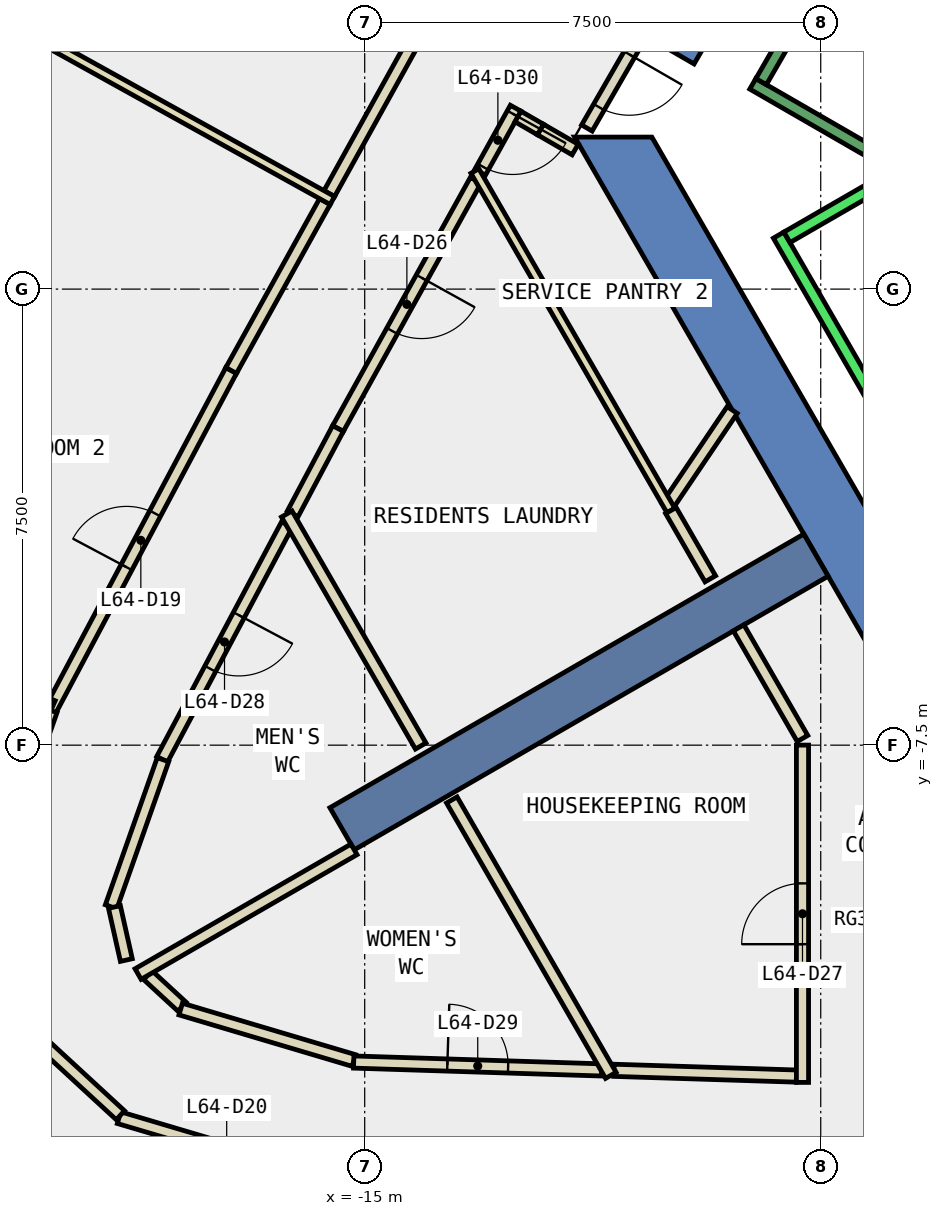
"""IFC4 building model, lengths in metres.
Left out: names, types, materials, properties, quantities, classifications, styles, units other than length and angle.
Written with IfcOpenShell. Run it as: python <this file> out.ifc"""

import sys

from ifc_helpers import new_model, si_unit, direction, frame, frame_2d, origin, place, context, subcontext, project, spatial, polyline, rectangle, outline, extrude, element, fill, save


model = new_model("IFC4")
c1 = context("Model", 3, precision=1e-05, world=origin(), true_north=direction((0.0, 1.0)))
c2 = subcontext(c1, "Body", "Model", "MODEL_VIEW")
j1 = project(units=[si_unit("LENGTHUNIT", "METRE"), si_unit("PLANEANGLEUNIT", "RADIAN")], contexts=[c1])
p1 = place(None, origin())
s1 = spatial("IfcSite", under=j1, at=p1, CompositionType="ELEMENT")
p2 = place(p1, origin())
s2 = spatial("IfcBuilding", under=s1, at=p2, CompositionType="ELEMENT")
p3 = place(p2, frame((0.0, 0.0, 277.4)))
s3 = spatial("IfcBuildingStorey", under=s2, at=p3, CompositionType="ELEMENT", Elevation=277.4)
p4 = place(p3, frame((0.0, 0.0, -0.34)))
e1 = element("IfcWall", 1, at=p4, inside=s3, PredefinedType="SHEAR", context=c2, shape_type="SweptSolid", body=[
    extrude(outline(polyline([(-10.535, 4.253), (-9.583, 3.703), (-5.138, 11.4), (-5.774, 12.5), (-10.535, 4.253)])), origin(), (0.0, 0.0, 1.0), 3.34),
])
p5 = place(p3, frame((0.0, 0.0, -0.34)))
e2 = element("IfcWall", 2, at=p5, inside=s3, PredefinedType="SHEAR", context=c2, shape_type="SweptSolid", body=[
    extrude(outline(polyline([(-11.547, 2.5), (-5.774, -7.5), (-5.138, -6.4), (-10.277, 2.5), (-11.547, 2.5)])), origin(), (0.0, 0.0, 1.0), 3.34),
])
p6 = place(p3, frame((-7.578, -4.375, -0.34), z_axis=(0.0, 0.0, 1.0), x_axis=(-0.866024315419, -0.5000018851, 0.0)))
e3 = element("IfcWall", 3, at=p6, inside=s3, PredefinedType="SHEAR", context=c2, shape_type="SweptSolid", body=[
    extrude(rectangle(XDim=9.0, YDim=0.8, at=frame_2d((4.5, 0.0))), origin(), (0.0, 0.0, 1.0), 3.34),
])
p7 = place(p3, frame((-19.984, 7.14, 0.0), z_axis=(0.0, 0.0, 1.0), x_axis=(-0.485049005017, -0.874486971162, 0.0)))
e4 = element("IfcWall", 4, at=p7, inside=s3, PredefinedType="STANDARD", context=c2, shape_type="SweptSolid", body=[
    extrude(rectangle(XDim=5.62, YDim=0.3, at=frame_2d((2.81, 0.0))), origin(), (0.0, 0.0, 1.0), 3.0),
])
p8 = place(p7, frame((0.455, 0.0, 0.9)))
e5 = element("IfcOpeningElement", 5, at=p8, cuts=e4, PredefinedType="OPENING", context=c2, shape_type="SweptSolid", body=[
    extrude(rectangle(XDim=1.9, YDim=2.0, at=frame_2d((0.95, 1.0))), frame((0.0, 0.16, 0.0), z_axis=(0.0, -1.0, 0.0), x_axis=(1.0, 0.0, 0.0)), (0.0, 0.0, 1.0), 0.32),
])
p9 = place(p7, frame((3.265, 0.0, 0.9)))
e6 = element("IfcOpeningElement", 6, at=p9, cuts=e4, PredefinedType="OPENING", context=c2, shape_type="SweptSolid", body=[
    extrude(rectangle(XDim=1.9, YDim=2.0, at=frame_2d((0.95, 1.0))), frame((0.0, 0.16, 0.0), z_axis=(0.0, -1.0, 0.0), x_axis=(1.0, 0.0, 0.0)), (0.0, 0.0, 1.0), 0.32),
])
p10 = place(p3, frame((-11.539, 2.295, 0.0), z_axis=(0.0, 0.0, 1.0), x_axis=(-0.86577241902, 0.500437926684, 0.0)))
e7 = element("IfcWall", 7, at=p10, inside=s3, PredefinedType="PARTITIONING", context=c2, shape_type="SweptSolid", body=[
    extrude(rectangle(XDim=0.66, YDim=0.2, at=frame_2d((0.33, 0.0))), origin(), (0.0, 0.0, 1.0), 2.4),
])
p11 = place(p3, frame((-12.517, 2.975, 0.0), z_axis=(0.0, 0.0, 1.0), x_axis=(-0.485195833999, -0.87440551386, 0.0)))
e8 = element("IfcWall", 8, at=p11, inside=s3, PredefinedType="PARTITIONING", context=c2, shape_type="SweptSolid", body=[
    extrude(rectangle(XDim=1.206, YDim=0.2, at=frame_2d((0.603, 0.0))), origin(), (0.0, 0.0, 1.0), 3.0),
])
p12 = place(p11, frame((0.103, 0.0, 0.0)))
e9 = element("IfcOpeningElement", 9, at=p12, cuts=e8, PredefinedType="OPENING", context=c2, shape_type="SweptSolid", body=[
    extrude(rectangle(XDim=1.0, YDim=2.1, at=frame_2d((0.5, 1.05))), frame((0.0, 0.11, 0.0), z_axis=(0.0, -1.0, 0.0), x_axis=(1.0, 0.0, 0.0)), (0.0, 0.0, 1.0), 0.22),
])
p13 = place(p3, frame((-13.174, 1.79, 0.0), z_axis=(0.0, 0.0, 1.0), x_axis=(-0.485079003918, -0.874470331091, 0.0)))
e10 = element("IfcWall", 10, at=p13, inside=s3, PredefinedType="PARTITIONING", context=c2, shape_type="SweptSolid", body=[
    extrude(rectangle(XDim=4.669, YDim=0.2, at=frame_2d((2.334, 0.0))), origin(), (0.0, 0.0, 1.0), 3.0),
])
p14 = place(p13, frame((1.834, 0.0, 0.0)))
e11 = element("IfcOpeningElement", 11, at=p14, cuts=e10, PredefinedType="OPENING", context=c2, shape_type="SweptSolid", body=[
    extrude(rectangle(XDim=1.0, YDim=2.1, at=frame_2d((0.5, 1.05))), frame((0.0, 0.11, 0.0), z_axis=(0.0, -1.0, 0.0), x_axis=(1.0, 0.0, 0.0)), (0.0, 0.0, 1.0), 0.22),
])
p15 = place(p3, frame((-15.439, -2.293, 0.0), z_axis=(0.0, 0.0, 1.0), x_axis=(-0.469248780065, -0.883066012486, 0.0)))
e12 = element("IfcWall", 12, at=p15, inside=s3, PredefinedType="PARTITIONING", context=c2, shape_type="SweptSolid", body=[
    extrude(rectangle(XDim=1.59, YDim=0.2, at=frame_2d((0.795, 0.0))), origin(), (0.0, 0.0, 1.0), 3.0),
])
p16 = place(p3, frame((-10.902, -12.847, 0.0), z_axis=(0.0, 0.0, 1.0), x_axis=(0.999500028713, -0.031617915847, 0.0)))
e13 = element("IfcWall", 13, at=p16, inside=s3, PredefinedType="PARTITIONING", context=c2, shape_type="SweptSolid", body=[
    extrude(rectangle(XDim=3.004, YDim=0.2, at=frame_2d((1.502, 0.0))), origin(), (0.0, 0.0, 1.0), 3.0),
])
p17 = place(p3, frame((-16.279, -3.873, 0.0), z_axis=(0.0, 0.0, 1.0), x_axis=(-0.469587967357, -0.882885689608, 0.0)))
e14 = element("IfcWall", 14, at=p17, inside=s3, PredefinedType="PARTITIONING", context=c2, shape_type="SweptSolid", body=[
    extrude(rectangle(XDim=4.372, YDim=0.2, at=frame_2d((2.186, 0.0))), origin(), (0.0, 0.0, 1.0), 3.0),
])
p18 = place(p17, frame((1.686, 0.0, 0.0)))
e15 = element("IfcOpeningElement", 15, at=p18, cuts=e14, PredefinedType="OPENING", context=c2, shape_type="SweptSolid", body=[
    extrude(rectangle(XDim=1.0, YDim=2.1, at=frame_2d((0.5, 1.05))), frame((0.0, 0.11, 0.0), z_axis=(0.0, -1.0, 0.0), x_axis=(1.0, 0.0, 0.0)), (0.0, 0.0, 1.0), 0.22),
])
p19 = place(p3, frame((-18.318, -7.739, 0.0), z_axis=(0.0, 0.0, 1.0), x_axis=(-0.332486504777, -0.943108012977, 0.0)))
e16 = element("IfcWall", 16, at=p19, inside=s3, PredefinedType="PARTITIONING", context=c2, shape_type="SweptSolid", body=[
    extrude(rectangle(XDim=2.565, YDim=0.2, at=frame_2d((1.282, 0.0))), origin(), (0.0, 0.0, 1.0), 3.0),
])
p20 = place(p3, frame((-19.116, -10.161, 0.0), z_axis=(0.0, 0.0, 1.0), x_axis=(0.219096654714, -0.975703159723, 0.0)))
e17 = element("IfcWall", 17, at=p20, inside=s3, PredefinedType="PARTITIONING", context=c2, shape_type="SweptSolid", body=[
    extrude(rectangle(XDim=0.895, YDim=0.2, at=frame_2d((0.447, 0.0))), origin(), (0.0, 0.0, 1.0), 3.0),
])
p21 = place(p3, frame((-18.567, -11.282, 0.0), z_axis=(0.0, 0.0, 1.0), x_axis=(0.735218904444, -0.677829744514, 0.0)))
e18 = element("IfcWall", 18, at=p21, inside=s3, PredefinedType="PARTITIONING", context=c2, shape_type="SweptSolid", body=[
    extrude(rectangle(XDim=0.766, YDim=0.2, at=frame_2d((0.383, 0.0))), origin(), (0.0, 0.0, 1.0), 3.0),
])
p22 = place(p3, frame((-18.026, -11.84, 0.0), z_axis=(0.0, 0.0, 1.0), x_axis=(0.958629704259, -0.284656090947, 0.0)))
e19 = element("IfcWall", 19, at=p22, inside=s3, PredefinedType="PARTITIONING", context=c2, shape_type="SweptSolid", body=[
    extrude(rectangle(XDim=2.972, YDim=0.2, at=frame_2d((1.486, 0.0))), origin(), (0.0, 0.0, 1.0), 3.0),
])
p23 = place(p3, frame((-15.181, -12.711, 0.0), z_axis=(0.0, 0.0, 1.0), x_axis=(0.999491493959, -0.031886572471, 0.0)))
e20 = element("IfcWall", 20, at=p23, inside=s3, PredefinedType="PARTITIONING", context=c2, shape_type="SweptSolid", body=[
    extrude(rectangle(XDim=4.081, YDim=0.2, at=frame_2d((2.041, 0.0))), origin(), (0.0, 0.0, 1.0), 3.0),
])
p24 = place(p23, frame((1.541, 0.0, 0.0)))
e21 = element("IfcOpeningElement", 21, at=p24, cuts=e20, PredefinedType="OPENING", context=c2, shape_type="SweptSolid", body=[
    extrude(rectangle(XDim=1.0, YDim=2.1, at=frame_2d((0.5, 1.05))), frame((0.0, 0.11, 0.0), z_axis=(0.0, -1.0, 0.0), x_axis=(1.0, 0.0, 0.0)), (0.0, 0.0, 1.0), 0.22),
])
p25 = place(p3, frame((-15.583, 1.571, 0.0), z_axis=(0.0, 0.0, 1.0), x_axis=(0.484944791944, 0.874544766588, 0.0)))
e22 = element("IfcWall", 22, at=p25, inside=s3, PredefinedType="PARTITIONING", context=c2, shape_type="SweptSolid", body=[
    extrude(rectangle(XDim=3.178, YDim=0.2, at=frame_2d((1.589, 0.0))), origin(), (0.0, 0.0, 1.0), 3.0),
])
p26 = place(p3, frame((-20.168, -6.926, 0.0), z_axis=(0.0, 0.0, 1.0), x_axis=(0.469552838911, 0.882904372778, 0.0)))
e23 = element("IfcWall", 23, at=p26, inside=s3, PredefinedType="PARTITIONING", context=c2, shape_type="SweptSolid", body=[
    extrude(rectangle(XDim=6.329, YDim=0.2, at=frame_2d((3.165, 0.0))), origin(), (0.0, 0.0, 1.0), 3.0),
])
p27 = place(p26, frame((2.665, 0.0, 0.0)))
e24 = element("IfcOpeningElement", 24, at=p27, cuts=e23, PredefinedType="OPENING", context=c2, shape_type="SweptSolid", body=[
    extrude(rectangle(XDim=1.0, YDim=2.1, at=frame_2d((0.5, 1.05))), frame((0.0, 0.11, 0.0), z_axis=(0.0, -1.0, 0.0), x_axis=(1.0, 0.0, 0.0)), (0.0, 0.0, 1.0), 0.22),
])
p28 = place(p3, frame((-17.196, -1.338, 0.0), z_axis=(0.0, 0.0, 1.0), x_axis=(0.485107756493, 0.87445438108, 0.0)))
e25 = element("IfcWall", 25, at=p28, inside=s3, PredefinedType="PARTITIONING", context=c2, shape_type="SweptSolid", body=[
    extrude(rectangle(XDim=3.177, YDim=0.2, at=frame_2d((1.588, 0.0))), origin(), (0.0, 0.0, 1.0), 3.0),
])
p29 = place(p3, frame((-15.499, -14.676, 0.0), z_axis=(0.0, 0.0, 1.0), x_axis=(-0.958734738219, 0.284302131073, 0.0)))
e26 = element("IfcWall", 26, at=p29, inside=s3, PredefinedType="PARTITIONING", context=c2, shape_type="SweptSolid", body=[
    extrude(rectangle(XDim=3.693, YDim=0.2, at=frame_2d((1.847, 0.0))), origin(), (0.0, 0.0, 1.0), 3.0),
])
p30 = place(p29, frame((1.347, 0.0, 0.0)))
e27 = element("IfcOpeningElement", 27, at=p30, cuts=e26, PredefinedType="OPENING", context=c2, shape_type="SweptSolid", body=[
    extrude(rectangle(XDim=1.0, YDim=2.1, at=frame_2d((0.5, 1.05))), frame((0.0, 0.11, 0.0), z_axis=(0.0, -1.0, 0.0), x_axis=(1.0, 0.0, 0.0)), (0.0, 0.0, 1.0), 0.22),
])
p31 = place(p3, frame((-19.018, -13.586, 0.0), z_axis=(0.0, 0.0, 1.0), x_axis=(-0.735547704352, 0.67747293276, 0.0)))
e28 = element("IfcWall", 28, at=p31, inside=s3, PredefinedType="PARTITIONING", context=c2, shape_type="SweptSolid", body=[
    extrude(rectangle(XDim=2.463, YDim=0.2, at=frame_2d((1.232, 0.0))), origin(), (0.0, 0.0, 1.0), 3.0),
])
p32 = place(p3, frame((-21.248, -10.035, 0.0), z_axis=(0.0, 0.0, 1.0), x_axis=(0.332233916116, 0.943197023417, 0.0)))
e29 = element("IfcWall", 29, at=p32, inside=s3, PredefinedType="PARTITIONING", context=c2, shape_type="SweptSolid", body=[
    extrude(rectangle(XDim=3.29, YDim=0.2, at=frame_2d((1.645, 0.0))), origin(), (0.0, 0.0, 1.0), 3.0),
])
p33 = place(p3, frame((-10.028, -3.575, 0.0), z_axis=(0.0, 0.0, 1.0), x_axis=(0.559779346026, 0.828641710127, 0.0)))
e30 = element("IfcWall", 30, at=p33, inside=s3, PredefinedType="PARTITIONING", context=c2, shape_type="SweptSolid", body=[
    extrude(rectangle(XDim=1.915, YDim=0.2, at=frame_2d((0.958, 0.0))), origin(), (0.0, 0.0, 1.0), 3.0),
])
p34 = place(p3, frame((-13.188, 1.942, 0.0), z_axis=(0.0, 0.0, 1.0), x_axis=(0.500061177503, -0.865990080056, 0.0)))
e31 = element("IfcWall", 31, at=p34, inside=s3, PredefinedType="PARTITIONING", context=c2, shape_type="SweptSolid", body=[
    extrude(rectangle(XDim=6.447, YDim=0.15, at=frame_2d((3.224, 0.0))), origin(), (0.0, 0.0, 1.0), 3.0),
])
p35 = place(p3, frame((-9.316, -4.764, 0.0), z_axis=(0.0, 0.0, 1.0), x_axis=(-0.49996696679, 0.866044474677, 0.0)))
e32 = element("IfcWall", 32, at=p35, inside=s3, PredefinedType="PARTITIONING", context=c2, shape_type="SweptSolid", body=[
    extrude(rectangle(XDim=1.296, YDim=0.2, at=frame_2d((0.648, 0.0))), origin(), (0.0, 0.0, 1.0), 3.0),
])
p36 = place(p3, frame((-7.8, -13.046, 0.0), z_axis=(0.0, 0.0, 1.0), x_axis=(0.0, 1.0, 0.0)))
e33 = element("IfcWall", 33, at=p36, inside=s3, PredefinedType="PARTITIONING", context=c2, shape_type="SweptSolid", body=[
    extrude(rectangle(XDim=5.547, YDim=0.2, at=frame_2d((2.773, 0.0))), origin(), (0.0, 0.0, 1.0), 3.0),
])
p37 = place(p36, frame((2.273, 0.0, 0.0)))
e34 = element("IfcOpeningElement", 34, at=p37, cuts=e33, PredefinedType="OPENING", context=c2, shape_type="SweptSolid", body=[
    extrude(rectangle(XDim=1.0, YDim=2.1, at=frame_2d((0.5, 1.05))), frame((0.0, 0.11, 0.0), z_axis=(0.0, -1.0, 0.0), x_axis=(1.0, 0.0, 0.0)), (0.0, 0.0, 1.0), 0.22),
])
p38 = place(p3, frame((-7.8, -7.39, 0.0), z_axis=(0.0, 0.0, 1.0), x_axis=(-0.499977374825, 0.866038466041, 0.0)))
e35 = element("IfcWall", 35, at=p38, inside=s3, PredefinedType="PARTITIONING", context=c2, shape_type="SweptSolid", body=[
    extrude(rectangle(XDim=2.1, YDim=0.2, at=frame_2d((1.05, 0.0))), origin(), (0.0, 0.0, 1.0), 3.0),
])
p39 = place(p3, frame((-14.079, -7.514, 0.0), z_axis=(0.0, 0.0, 1.0), x_axis=(-0.499959077901, 0.86604902888, 0.0)))
e36 = element("IfcWall", 36, at=p39, inside=s3, PredefinedType="PARTITIONING", context=c2, shape_type="SweptSolid", body=[
    extrude(rectangle(XDim=4.406, YDim=0.2, at=frame_2d((2.203, 0.0))), origin(), (0.0, 0.0, 1.0), 3.0),
])
p40 = place(p3, frame((-10.952, -12.93, 0.0), z_axis=(0.0, 0.0, 1.0), x_axis=(-0.50002013732, 0.866013777185, 0.0)))
e37 = element("IfcWall", 37, at=p40, inside=s3, PredefinedType="PARTITIONING", context=c2, shape_type="SweptSolid", body=[
    extrude(rectangle(XDim=5.23, YDim=0.2, at=frame_2d((2.615, 0.0))), origin(), (0.0, 0.0, 1.0), 3.0),
])
p41 = place(p3, frame((-15.176, -9.214, 0.0), z_axis=(0.0, 0.0, 1.0), x_axis=(-0.86606561423, -0.499930346997, 0.0)))
e38 = element("IfcWall", 38, at=p41, inside=s3, PredefinedType="PARTITIONING", context=c2, shape_type="SweptSolid", body=[
    extrude(rectangle(XDim=4.1, YDim=0.2, at=frame_2d((2.05, 0.0))), origin(), (0.0, 0.0, 1.0), 3.0),
])
p42 = place(p3, frame((-15.532, 1.457, 0.0), z_axis=(0.0, 0.0, 1.0), x_axis=(-0.874467143452, 0.485084750351, 0.0)))
e39 = element("IfcWall", 39, at=p42, inside=s3, PredefinedType="PARTITIONING", context=c2, shape_type="SweptSolid", body=[
    extrude(rectangle(XDim=6.5, YDim=0.15, at=frame_2d((3.25, 0.0))), origin(), (0.0, 0.0, 1.0), 3.0),
])
p43 = place(p3, frame((-20.121, -6.838, 0.0), z_axis=(0.0, 0.0, 1.0), x_axis=(-0.91561994307, 0.402044922679, 0.0)))
e40 = element("IfcWall", 40, at=p43, inside=s3, PredefinedType="PARTITIONING", context=c2, shape_type="SweptSolid", body=[
    extrude(rectangle(XDim=5.096, YDim=0.15, at=frame_2d((2.548, 0.0))), origin(), (0.0, 0.0, 1.0), 3.0),
])
p44 = place(p3, frame((-10.449, 4.203, 0.0), z_axis=(0.0, 0.0, 1.0), x_axis=(-0.499914839587, -0.866074565589, 0.0)))
e41 = element("IfcWall", 41, at=p44, inside=s3, PredefinedType="PARTITIONING", context=c2, shape_type="SweptSolid", body=[
    extrude(rectangle(XDim=1.794, YDim=0.2, at=frame_2d((0.897, 0.0))), origin(), (0.0, 0.0, 1.0), 2.4),
])
p45 = place(p44, frame((0.397, 0.0, 0.0)))
e42 = element("IfcOpeningElement", 42, at=p45, cuts=e41, PredefinedType="OPENING", context=c2, shape_type="SweptSolid", body=[
    extrude(rectangle(XDim=1.0, YDim=2.1, at=frame_2d((0.5, 1.05))), frame((0.0, 0.11, 0.0), z_axis=(0.0, -1.0, 0.0), x_axis=(1.0, 0.0, 0.0)), (0.0, 0.0, 1.0), 0.22),
])
p46 = place(p3, frame((-12.11, 2.625, 0.0), z_axis=(0.0, 0.0, 1.0), x_axis=(-0.86611877815, 0.499838235968, 0.0)))
e43 = element("IfcWall", 43, at=p46, inside=s3, PredefinedType="PARTITIONING", context=c2, shape_type="SweptSolid", body=[
    extrude(rectangle(XDim=0.426, YDim=0.2, at=frame_2d((0.213, 0.0))), origin(), (0.0, 0.0, 1.0), 3.0),
])
p47 = place(p3, frame((-8.192, 0.888, 0.0), z_axis=(0.0, 0.0, 1.0), x_axis=(0.500034260056, -0.866005622828, 0.0)))
e44 = element("IfcWall", 44, at=p47, inside=s3, PredefinedType="STANDARD", context=c2, shape_type="SweptSolid", body=[
    extrude(rectangle(XDim=5.399, YDim=0.2, at=frame_2d((2.7, 0.0))), origin(), (0.0, 0.0, 1.0), 3.0),
])
for number, where, z_axis, x_axis in (
    (45, (-5.977, 2.052, 0.0), (0.0, 0.0, 1.0), (-0.866, -0.5, 0.0)),
    (46, (-4.677, -0.2, 0.0), (0.0, 0.0, 1.0), (-0.866, -0.5, 0.0)),
):
    element("IfcWall", number, at=place(p3, frame(where, z_axis=z_axis, x_axis=x_axis)), inside=s3, PredefinedType="STANDARD", context=c2, shape_type="SweptSolid", body=[
        extrude(rectangle(XDim=2.399, YDim=0.2, at=frame_2d((1.2, 0.0))), origin(), (0.0, 0.0, 1.0), 3.0),
    ])
p48 = place(p3, frame((-6.25, 2.01, 0.0), z_axis=(0.0, 0.0, 1.0), x_axis=(-0.86611865017, 0.499838457731, 0.0)))
e47 = element("IfcWall", 47, at=p48, inside=s3, PredefinedType="STANDARD", context=c2, shape_type="SweptSolid", body=[
    extrude(rectangle(XDim=2.733, YDim=0.2, at=frame_2d((1.366, 0.0))), origin(), (0.0, 0.0, 1.0), 3.0),
])
p49 = place(p3, frame((-5.03, 9.388, 0.0), z_axis=(0.0, 0.0, 1.0), x_axis=(-0.499978703459, -0.866037698999, 0.0)))
e48 = element("IfcWall", 48, at=p49, inside=s3, PredefinedType="STANDARD", context=c2, shape_type="SweptSolid", body=[
    extrude(rectangle(XDim=6.9, YDim=0.2, at=frame_2d((3.45, 0.0))), origin(), (0.0, 0.0, 1.0), 3.0),
])
p50 = place(p27, origin())
e49 = element("IfcDoor", 49, at=p50, inside=s3, OperationType="SINGLE_SWING_LEFT", PredefinedType="DOOR", context=c2, shape_type="SweptSolid", body=[
    extrude(rectangle(XDim=1.0, YDim=2.1, at=frame_2d((0.5, 1.05))), frame((0.0, 0.025, 0.0), z_axis=(0.0, -1.0, 0.0), x_axis=(1.0, 0.0, 0.0)), (0.0, 0.0, 1.0), 0.05),
])
fill(e24, e49)
p51 = place(p14, origin())
e50 = element("IfcDoor", 50, at=p51, inside=s3, OperationType="SINGLE_SWING_LEFT", PredefinedType="DOOR", context=c2, shape_type="SweptSolid", body=[
    extrude(rectangle(XDim=1.0, YDim=2.1, at=frame_2d((0.5, 1.05))), frame((0.0, 0.025, 0.0), z_axis=(0.0, -1.0, 0.0), x_axis=(1.0, 0.0, 0.0)), (0.0, 0.0, 1.0), 0.05),
])
fill(e11, e50)
p52 = place(p37, origin())
e51 = element("IfcDoor", 51, at=p52, inside=s3, OperationType="SINGLE_SWING_LEFT", PredefinedType="DOOR", context=c2, shape_type="SweptSolid", body=[
    extrude(rectangle(XDim=1.0, YDim=2.1, at=frame_2d((0.5, 1.05))), frame((0.0, 0.025, 0.0), z_axis=(0.0, -1.0, 0.0), x_axis=(1.0, 0.0, 0.0)), (0.0, 0.0, 1.0), 0.05),
])
fill(e34, e51)
p53 = place(p18, origin())
e52 = element("IfcDoor", 52, at=p53, inside=s3, OperationType="SINGLE_SWING_LEFT", PredefinedType="DOOR", context=c2, shape_type="SweptSolid", body=[
    extrude(rectangle(XDim=1.0, YDim=2.1, at=frame_2d((0.5, 1.05))), frame((0.0, 0.025, 0.0), z_axis=(0.0, -1.0, 0.0), x_axis=(1.0, 0.0, 0.0)), (0.0, 0.0, 1.0), 0.05),
])
fill(e15, e52)
p54 = place(p24, origin())
e53 = element("IfcDoor", 53, at=p54, inside=s3, OperationType="SINGLE_SWING_LEFT", PredefinedType="DOOR", context=c2, shape_type="SweptSolid", body=[
    extrude(rectangle(XDim=1.0, YDim=2.1, at=frame_2d((0.5, 1.05))), frame((0.0, 0.025, 0.0), z_axis=(0.0, -1.0, 0.0), x_axis=(1.0, 0.0, 0.0)), (0.0, 0.0, 1.0), 0.05),
])
fill(e21, e53)
p55 = place(p12, origin())
e54 = element("IfcDoor", 54, at=p55, inside=s3, OperationType="SINGLE_SWING_RIGHT", PredefinedType="DOOR", context=c2, shape_type="SweptSolid", body=[
    extrude(rectangle(XDim=1.0, YDim=2.1, at=frame_2d((0.5, 1.05))), frame((0.0, 0.025, 0.0), z_axis=(0.0, -1.0, 0.0), x_axis=(1.0, 0.0, 0.0)), (0.0, 0.0, 1.0), 0.05),
])
fill(e9, e54)
p56 = place(p45, origin())
e55 = element("IfcDoor", 55, at=p56, inside=s3, OperationType="SINGLE_SWING_LEFT", PredefinedType="DOOR", context=c2, shape_type="SweptSolid", body=[
    extrude(rectangle(XDim=1.0, YDim=2.1, at=frame_2d((0.5, 1.05))), frame((0.0, 0.025, 0.0), z_axis=(0.0, -1.0, 0.0), x_axis=(1.0, 0.0, 0.0)), (0.0, 0.0, 1.0), 0.05),
])
fill(e42, e55)
save(model, sys.argv[1])
